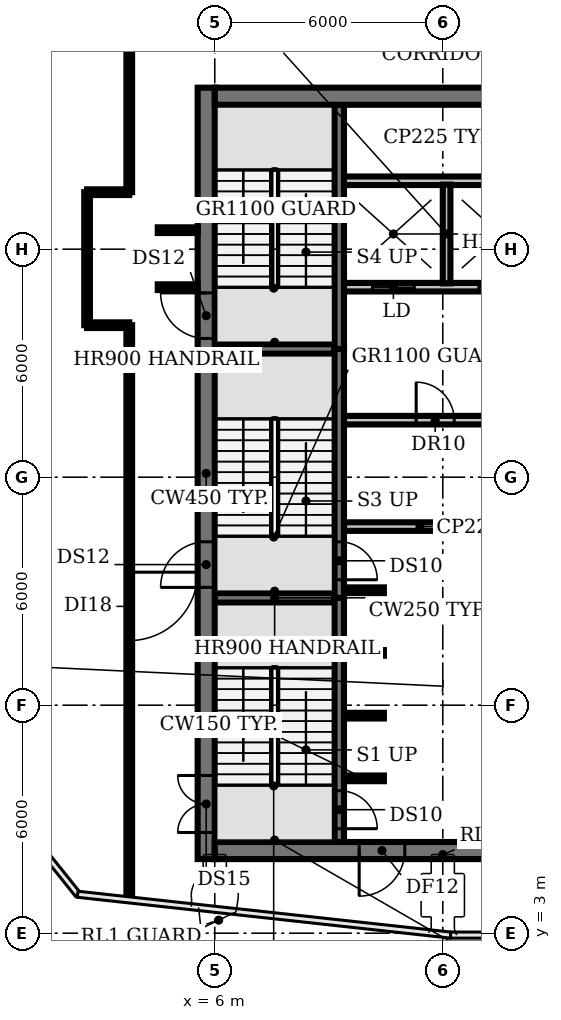
"""IFC4 building model, lengths in metres.
Left out: names, types, materials, properties, quantities, classifications, styles, units other than length and angle.
Written with IfcOpenShell. Run it as: python <this file> out.ifc"""

import sys

from ifc_helpers import new_model, si_unit, direction, frame, frame_2d, origin, place, context, subcontext, project, spatial, rectangle, extrude, element, fill, save


model = new_model("IFC4")
c1 = context("Model", 3, precision=1e-05, world=origin(), true_north=direction((0.0, 1.0)))
c2 = subcontext(c1, "Body", "Model", "MODEL_VIEW")
j1 = project(units=[si_unit("LENGTHUNIT", "METRE"), si_unit("PLANEANGLEUNIT", "RADIAN")], contexts=[c1])
p1 = place(None, origin())
s1 = spatial("IfcSite", under=j1, at=p1, CompositionType="ELEMENT")
p2 = place(p1, origin())
s2 = spatial("IfcBuilding", under=s1, at=p2, CompositionType="ELEMENT")
p3 = place(p2, frame((0.0, 0.0, 255.8)))
s3 = spatial("IfcBuildingStorey", under=s2, at=p3, CompositionType="ELEMENT", Elevation=255.8)
for number, where, z_axis, x_axis in (
    (1, (9.4, 7.075, 0.0), (0.0, 0.0, 1.0), (1.0, 0.0, 0.0)),
    (2, (9.4, 8.725, 0.0), (0.0, 0.0, 1.0), (1.0, 0.0, 0.0)),
    (3, (9.4, 10.375, 0.0), (0.0, 0.0, 1.0), (1.0, 0.0, 0.0)),
):
    element("IfcWall", number, at=place(p3, frame(where, z_axis=z_axis, x_axis=x_axis)), inside=s3, PredefinedType="SHEAR", context=c2, shape_type="SweptSolid", body=[
        extrude(rectangle(XDim=1.05, YDim=0.15, at=frame_2d((0.525, 0.0))), origin(), (0.0, 0.0, 1.0), 8.05),
    ])
p4 = place(p3, frame((6.0, 11.825, 0.0), z_axis=(0.0, 0.0, 1.0), x_axis=(1.0, 0.0, 0.0)))
e4 = element("IfcWall", 4, at=p4, inside=s3, PredefinedType="SHEAR", context=c2, shape_type="SweptSolid", body=[
    extrude(rectangle(XDim=3.15, YDim=0.25, at=frame_2d((1.575, 0.0))), origin(), (0.0, 0.0, 1.0), 8.05),
])
p5 = place(p3, frame((9.4, 12.025, 0.0), z_axis=(0.0, 0.0, 1.0), x_axis=(1.0, 0.0, 0.0)))
e5 = element("IfcWall", 5, at=p5, inside=s3, PredefinedType="SHEAR", context=c2, shape_type="SweptSolid", body=[
    extrude(rectangle(XDim=1.05, YDim=0.15, at=frame_2d((0.525, 0.0))), origin(), (0.0, 0.0, 1.0), 8.05),
])
p6 = place(p3, frame((9.4, 13.7, 0.0), z_axis=(0.0, 0.0, 1.0), x_axis=(1.0, 0.0, 0.0)))
e6 = element("IfcWall", 6, at=p6, inside=s3, PredefinedType="PARTITIONING", context=c2, shape_type="SweptSolid", body=[
    extrude(rectangle(XDim=4.0, YDim=0.225, at=frame_2d((2.0, 0.0))), origin(), (0.0, 0.0, 1.0), 8.05),
])
p7 = place(p3, frame((9.4, 16.5, 0.0), z_axis=(0.0, 0.0, 1.0), x_axis=(1.0, 0.0, 0.0)))
e7 = element("IfcWall", 7, at=p7, inside=s3, PredefinedType="PARTITIONING", context=c2, shape_type="SweptSolid", body=[
    extrude(rectangle(XDim=14.6, YDim=0.225, at=frame_2d((7.3, 0.0))), origin(), (0.0, 0.0, 1.0), 8.05),
])
p8 = place(p7, frame((1.9, 0.0, 0.0)))
e8 = element("IfcOpeningElement", 8, at=p8, cuts=e7, PredefinedType="OPENING", context=c2, shape_type="SweptSolid", body=[
    extrude(rectangle(XDim=1.0, YDim=2.1, at=frame_2d((0.5, 1.05))), frame((0.0, 0.123, 0.0), z_axis=(0.0, -1.0, 0.0), x_axis=(1.0, 0.0, 0.0)), (0.0, 0.0, 1.0), 0.245),
])
p9 = place(p7, frame((7.475, 0.0, 0.0)))
e9 = element("IfcOpeningElement", 9, at=p9, cuts=e7, PredefinedType="OPENING", context=c2, shape_type="SweptSolid", body=[
    extrude(rectangle(XDim=1.0, YDim=2.1, at=frame_2d((0.5, 1.05))), frame((0.0, 0.123, 0.0), z_axis=(0.0, -1.0, 0.0), x_axis=(1.0, 0.0, 0.0)), (0.0, 0.0, 1.0), 0.245),
])
p10 = place(p7, frame((11.647, 0.0, 0.0)))
e10 = element("IfcOpeningElement", 10, at=p10, cuts=e7, PredefinedType="OPENING", context=c2, shape_type="SweptSolid", body=[
    extrude(rectangle(XDim=0.9, YDim=2.1, at=frame_2d((0.45, 1.05))), frame((0.0, 0.123, 0.0), z_axis=(0.0, -1.0, 0.0), x_axis=(1.0, 0.0, 0.0)), (0.0, 0.0, 1.0), 0.245),
])
p11 = place(p7, frame((13.423, 0.0, 0.0)))
e11 = element("IfcOpeningElement", 11, at=p11, cuts=e7, PredefinedType="OPENING", context=c2, shape_type="SweptSolid", body=[
    extrude(rectangle(XDim=0.9, YDim=2.1, at=frame_2d((0.45, 1.05))), frame((0.0, 0.123, 0.0), z_axis=(0.0, -1.0, 0.0), x_axis=(1.0, 0.0, 0.0)), (0.0, 0.0, 1.0), 0.245),
])
p12 = place(p3, frame((6.0, 18.375, 0.0), z_axis=(0.0, 0.0, 1.0), x_axis=(1.0, 0.0, 0.0)))
e12 = element("IfcWall", 12, at=p12, inside=s3, PredefinedType="SHEAR", context=c2, shape_type="SweptSolid", body=[
    extrude(rectangle(XDim=3.15, YDim=0.25, at=frame_2d((1.575, 0.0))), origin(), (0.0, 0.0, 1.0), 8.05),
])
p13 = place(p3, frame((24.0, 20.0, 0.0), z_axis=(0.0, 0.0, 1.0), x_axis=(-1.0, 0.0, 0.0)))
e13 = element("IfcWall", 13, at=p13, inside=s3, PredefinedType="PARTITIONING", context=c2, shape_type="SweptSolid", body=[
    extrude(rectangle(XDim=14.6, YDim=0.225, at=frame_2d((7.3, 0.0))), origin(), (0.0, 0.0, 1.0), 8.05),
])
p14 = place(p13, frame((12.75, 0.0, 0.0)))
e14 = element("IfcOpeningElement", 14, at=p14, cuts=e13, PredefinedType="OPENING", context=c2, shape_type="SweptSolid", body=[
    extrude(rectangle(XDim=1.1, YDim=2.1, at=frame_2d((0.55, 1.05))), frame((0.0, 0.123, 0.0), z_axis=(0.0, -1.0, 0.0), x_axis=(1.0, 0.0, 0.0)), (0.0, 0.0, 1.0), 0.245),
])
p15 = place(p13, frame((9.95, 0.0, 0.0)))
e15 = element("IfcOpeningElement", 15, at=p15, cuts=e13, PredefinedType="OPENING", context=c2, shape_type="SweptSolid", body=[
    extrude(rectangle(XDim=1.1, YDim=2.1, at=frame_2d((0.55, 1.05))), frame((0.0, 0.123, 0.0), z_axis=(0.0, -1.0, 0.0), x_axis=(1.0, 0.0, 0.0)), (0.0, 0.0, 1.0), 0.245),
])
p16 = place(p13, frame((7.15, 0.0, 0.0)))
e16 = element("IfcOpeningElement", 16, at=p16, cuts=e13, PredefinedType="OPENING", context=c2, shape_type="SweptSolid", body=[
    extrude(rectangle(XDim=1.1, YDim=2.1, at=frame_2d((0.55, 1.05))), frame((0.0, 0.123, 0.0), z_axis=(0.0, -1.0, 0.0), x_axis=(1.0, 0.0, 0.0)), (0.0, 0.0, 1.0), 0.245),
])
p17 = place(p13, frame((4.35, 0.0, 0.0)))
e17 = element("IfcOpeningElement", 17, at=p17, cuts=e13, PredefinedType="OPENING", context=c2, shape_type="SweptSolid", body=[
    extrude(rectangle(XDim=1.1, YDim=2.1, at=frame_2d((0.55, 1.05))), frame((0.0, 0.123, 0.0), z_axis=(0.0, -1.0, 0.0), x_axis=(1.0, 0.0, 0.0)), (0.0, 0.0, 1.0), 0.245),
])
p18 = place(p13, frame((2.137, 0.0, 0.0)))
e18 = element("IfcOpeningElement", 18, at=p18, cuts=e13, PredefinedType="OPENING", context=c2, shape_type="SweptSolid", body=[
    extrude(rectangle(XDim=0.9, YDim=2.1, at=frame_2d((0.45, 1.05))), frame((0.0, 0.123, 0.0), z_axis=(0.0, -1.0, 0.0), x_axis=(1.0, 0.0, 0.0)), (0.0, 0.0, 1.0), 0.245),
])
p19 = place(p13, frame((0.363, 0.0, 0.0)))
e19 = element("IfcOpeningElement", 19, at=p19, cuts=e13, PredefinedType="OPENING", context=c2, shape_type="SweptSolid", body=[
    extrude(rectangle(XDim=0.9, YDim=2.1, at=frame_2d((0.45, 1.05))), frame((0.0, 0.123, 0.0), z_axis=(0.0, -1.0, 0.0), x_axis=(1.0, 0.0, 0.0)), (0.0, 0.0, 1.0), 0.245),
])
p20 = place(p3, frame((9.4, 22.8, 0.0), z_axis=(0.0, 0.0, 1.0), x_axis=(1.0, 0.0, 0.0)))
e20 = element("IfcWall", 20, at=p20, inside=s3, PredefinedType="PARTITIONING", context=c2, shape_type="SweptSolid", body=[
    extrude(rectangle(XDim=14.6, YDim=0.225, at=frame_2d((7.3, 0.0))), origin(), (0.0, 0.0, 1.0), 8.05),
])
p21 = place(p3, frame((9.275, 11.825, 0.0), z_axis=(0.0, 0.0, 1.0), x_axis=(0.0, -1.0, 0.0)))
e21 = element("IfcWall", 21, at=p21, inside=s3, PredefinedType="SHEAR", context=c2, shape_type="SweptSolid", body=[
    extrude(rectangle(XDim=6.425, YDim=0.25, at=frame_2d((3.212, 0.0))), origin(), (0.0, 0.0, 1.0), 8.05),
])
p22 = place(p21, frame((5.075, 0.0, 0.0)))
e22 = element("IfcOpeningElement", 22, at=p22, cuts=e21, PredefinedType="OPENING", context=c2, shape_type="SweptSolid", body=[
    extrude(rectangle(XDim=1.0, YDim=2.1, at=frame_2d((0.5, 1.05))), frame((0.0, 0.135, 0.0), z_axis=(0.0, -1.0, 0.0), x_axis=(1.0, 0.0, 0.0)), (0.0, 0.0, 1.0), 0.27),
])
p23 = place(p3, frame((9.275, 18.375, 0.0), z_axis=(0.0, 0.0, 1.0), x_axis=(0.0, -1.0, 0.0)))
e23 = element("IfcWall", 23, at=p23, inside=s3, PredefinedType="SHEAR", context=c2, shape_type="SweptSolid", body=[
    extrude(rectangle(XDim=6.55, YDim=0.25, at=frame_2d((3.275, 0.0))), origin(), (0.0, 0.0, 1.0), 8.05),
])
p24 = place(p23, frame((5.075, 0.0, 0.0)))
e24 = element("IfcOpeningElement", 24, at=p24, cuts=e23, PredefinedType="OPENING", context=c2, shape_type="SweptSolid", body=[
    extrude(rectangle(XDim=1.0, YDim=2.1, at=frame_2d((0.5, 1.05))), frame((0.0, 0.135, 0.0), z_axis=(0.0, -1.0, 0.0), x_axis=(1.0, 0.0, 0.0)), (0.0, 0.0, 1.0), 0.27),
])
p25 = place(p3, frame((9.275, 18.375, 0.0), z_axis=(0.0, 0.0, 1.0), x_axis=(0.0, 1.0, 0.0)))
e25 = element("IfcWall", 25, at=p25, inside=s3, PredefinedType="SHEAR", context=c2, shape_type="SweptSolid", body=[
    extrude(rectangle(XDim=6.425, YDim=0.25, at=frame_2d((3.212, 0.0))), origin(), (0.0, 0.0, 1.0), 8.05),
])
p26 = place(p3, frame((12.1, 20.1, 0.0), z_axis=(0.0, 0.0, 1.0), x_axis=(0.0, 1.0, 0.0)))
e26 = element("IfcWall", 26, at=p26, inside=s3, PredefinedType="SOLIDWALL", context=c2, shape_type="SweptSolid", body=[
    extrude(rectangle(XDim=2.6, YDim=0.2, at=frame_2d((1.3, 0.0))), origin(), (0.0, 0.0, 1.0), 8.05),
])
p27 = place(p3, frame((5.775, 4.95, 0.0), z_axis=(0.0, 0.0, 1.0), x_axis=(0.0, 1.0, 0.0)))
e27 = element("IfcWall", 27, at=p27, inside=s3, PredefinedType="SHEAR", context=c2, shape_type="SweptSolid", body=[
    extrude(rectangle(XDim=20.3, YDim=0.45, at=frame_2d((10.15, 0.0))), origin(), (0.0, 0.0, 1.0), 8.05),
])
p28 = place(p27, frame((0.7, 0.0, 0.0)))
e28 = element("IfcOpeningElement", 28, at=p28, cuts=e27, PredefinedType="OPENING", context=c2, shape_type="SweptSolid", body=[
    extrude(rectangle(XDim=1.5, YDim=2.1, at=frame_2d((0.75, 1.05))), frame((0.0, 0.235, 0.0), z_axis=(0.0, -1.0, 0.0), x_axis=(1.0, 0.0, 0.0)), (0.0, 0.0, 1.0), 0.47),
])
p29 = place(p27, frame((7.15, 0.0, 0.0)))
e29 = element("IfcOpeningElement", 29, at=p29, cuts=e27, PredefinedType="OPENING", context=c2, shape_type="SweptSolid", body=[
    extrude(rectangle(XDim=1.2, YDim=2.1, at=frame_2d((0.6, 1.05))), frame((0.0, 0.235, 0.0), z_axis=(0.0, -1.0, 0.0), x_axis=(1.0, 0.0, 0.0)), (0.0, 0.0, 1.0), 0.47),
])
p30 = place(p27, frame((13.7, 0.0, 0.0)))
e30 = element("IfcOpeningElement", 30, at=p30, cuts=e27, PredefinedType="OPENING", context=c2, shape_type="SweptSolid", body=[
    extrude(rectangle(XDim=1.2, YDim=2.1, at=frame_2d((0.6, 1.05))), frame((0.0, 0.235, 0.0), z_axis=(0.0, -1.0, 0.0), x_axis=(1.0, 0.0, 0.0)), (0.0, 0.0, 1.0), 0.47),
])
p31 = place(p3, frame((24.0, 5.175, 0.0), z_axis=(0.0, 0.0, 1.0), x_axis=(-1.0, 0.0, 0.0)))
e31 = element("IfcWall", 31, at=p31, inside=s3, PredefinedType="SHEAR", context=c2, shape_type="SweptSolid", body=[
    extrude(rectangle(XDim=18.0, YDim=0.45, at=frame_2d((9.0, 0.0))), origin(), (0.0, 0.0, 1.0), 8.05),
])
p32 = place(p31, frame((13.0, 0.0, 0.0)))
e32 = element("IfcOpeningElement", 32, at=p32, cuts=e31, PredefinedType="OPENING", context=c2, shape_type="SweptSolid", body=[
    extrude(rectangle(XDim=1.2, YDim=2.1, at=frame_2d((0.6, 1.05))), frame((0.0, 0.235, 0.0), z_axis=(0.0, -1.0, 0.0), x_axis=(1.0, 0.0, 0.0)), (0.0, 0.0, 1.0), 0.47),
])
p33 = place(p31, frame((4.05, 0.0, 0.0)))
e33 = element("IfcOpeningElement", 33, at=p33, cuts=e31, PredefinedType="OPENING", context=c2, shape_type="SweptSolid", body=[
    extrude(rectangle(XDim=1.0, YDim=2.1, at=frame_2d((0.5, 1.05))), frame((0.0, 0.235, 0.0), z_axis=(0.0, -1.0, 0.0), x_axis=(1.0, 0.0, 0.0)), (0.0, 0.0, 1.0), 0.47),
])
p34 = place(p3, frame((6.0, 25.025, 0.0), z_axis=(0.0, 0.0, 1.0), x_axis=(1.0, 0.0, 0.0)))
e34 = element("IfcWall", 34, at=p34, inside=s3, PredefinedType="SHEAR", context=c2, shape_type="SweptSolid", body=[
    extrude(rectangle(XDim=18.0, YDim=0.45, at=frame_2d((9.0, 0.0))), origin(), (0.0, 0.0, 1.0), 8.05),
])
p35 = place(p3, frame((2.64, 19.0, 0.0), z_axis=(0.0, 0.0, 1.0), x_axis=(0.0, 1.0, 0.0)))
e35 = element("IfcWall", 35, at=p35, inside=s3, PredefinedType="PARTITIONING", context=c2, shape_type="SweptSolid", body=[
    extrude(rectangle(XDim=3.5, YDim=0.15, at=frame_2d((1.75, 0.0))), origin(), (0.0, 0.0, 1.0), 6.33),
])
for number, where, z_axis, x_axis in (
    (36, (2.64, 19.0, 0.0), (0.0, 0.0, 1.0), (1.0, 0.0, 0.0)),
    (37, (2.64, 22.5, 0.0), (0.0, 0.0, 1.0), (1.0, 0.0, 0.0)),
):
    element("IfcWall", number, at=place(p3, frame(where, z_axis=z_axis, x_axis=x_axis)), inside=s3, PredefinedType="PARTITIONING", context=c2, shape_type="SweptSolid", body=[
        extrude(rectangle(XDim=1.11, YDim=0.15, at=frame_2d((0.555, 0.0))), origin(), (0.0, 0.0, 1.0), 6.33),
    ])
p36 = place(p3, frame((3.75, 19.0, 0.0), z_axis=(0.0, 0.0, 1.0), x_axis=(0.0, -1.0, 0.0)))
e38 = element("IfcWall", 38, at=p36, inside=s3, PredefinedType="PARTITIONING", context=c2, shape_type="SweptSolid", body=[
    extrude(rectangle(XDim=15.07, YDim=0.15, at=frame_2d((7.535, 0.0))), origin(), (0.0, 0.0, 1.0), 6.33),
])
p37 = place(p36, frame((6.5, 0.0, 0.0)))
e39 = element("IfcOpeningElement", 39, at=p37, cuts=e38, PredefinedType="OPENING", context=c2, shape_type="SweptSolid", body=[
    extrude(rectangle(XDim=1.8, YDim=2.1, at=frame_2d((0.9, 1.05))), frame((0.0, 0.085, 0.0), z_axis=(0.0, -1.0, 0.0), x_axis=(1.0, 0.0, 0.0)), (0.0, 0.0, 1.0), 0.17),
])
p38 = place(p3, frame((3.75, 22.5, 0.0), z_axis=(0.0, 0.0, 1.0), x_axis=(0.0, 1.0, 0.0)))
e40 = element("IfcWall", 40, at=p38, inside=s3, PredefinedType="PARTITIONING", context=c2, shape_type="SweptSolid", body=[
    extrude(rectangle(XDim=4.55, YDim=0.15, at=frame_2d((2.275, 0.0))), origin(), (0.0, 0.0, 1.0), 6.33),
])
for number, where, z_axis, x_axis in (
    (41, (4.5, 20.0, 0.0), (0.0, 0.0, 1.0), (1.0, 0.0, 0.0)),
    (42, (4.5, 21.5, 0.0), (0.0, 0.0, 1.0), (1.0, 0.0, 0.0)),
):
    element("IfcWall", number, at=place(p3, frame(where, z_axis=z_axis, x_axis=x_axis)), inside=s3, PredefinedType="PARTITIONING", context=c2, shape_type="SweptSolid", body=[
        extrude(rectangle(XDim=1.05, YDim=0.15, at=frame_2d((0.525, 0.0))), origin(), (0.0, 0.0, 1.0), 6.33),
    ])
p39 = place(p8, origin())
e43 = element("IfcDoor", 43, at=p39, inside=s3, OperationType="SINGLE_SWING_LEFT", PredefinedType="DOOR", context=c2, shape_type="SweptSolid", body=[
    extrude(rectangle(XDim=1.0, YDim=2.1, at=frame_2d((0.5, 1.05))), frame((0.0, 0.025, 0.0), z_axis=(0.0, -1.0, 0.0), x_axis=(1.0, 0.0, 0.0)), (0.0, 0.0, 1.0), 0.05),
])
fill(e8, e43)
p40 = place(p14, origin())
e44 = element("IfcDoor", 44, at=p40, inside=s3, OperationType="DOUBLE_DOOR_SLIDING", PredefinedType="DOOR", context=c2, shape_type="SweptSolid", body=[
    extrude(rectangle(XDim=1.1, YDim=2.1, at=frame_2d((0.55, 1.05))), frame((0.0, 0.025, 0.0), z_axis=(0.0, -1.0, 0.0), x_axis=(1.0, 0.0, 0.0)), (0.0, 0.0, 1.0), 0.05),
])
fill(e14, e44)
p41 = place(p15, origin())
e45 = element("IfcDoor", 45, at=p41, inside=s3, OperationType="DOUBLE_DOOR_SLIDING", PredefinedType="DOOR", context=c2, shape_type="SweptSolid", body=[
    extrude(rectangle(XDim=1.1, YDim=2.1, at=frame_2d((0.55, 1.05))), frame((0.0, 0.025, 0.0), z_axis=(0.0, -1.0, 0.0), x_axis=(1.0, 0.0, 0.0)), (0.0, 0.0, 1.0), 0.05),
])
fill(e15, e45)
p42 = place(p22, origin())
e46 = element("IfcDoor", 46, at=p42, inside=s3, OperationType="SINGLE_SWING_RIGHT", PredefinedType="DOOR", context=c2, shape_type="SweptSolid", body=[
    extrude(rectangle(XDim=1.0, YDim=2.1, at=frame_2d((0.5, 1.05))), frame((0.0, 0.025, 0.0), z_axis=(0.0, -1.0, 0.0), x_axis=(1.0, 0.0, 0.0)), (0.0, 0.0, 1.0), 0.05),
])
fill(e22, e46)
p43 = place(p24, origin())
e47 = element("IfcDoor", 47, at=p43, inside=s3, OperationType="SINGLE_SWING_RIGHT", PredefinedType="DOOR", context=c2, shape_type="SweptSolid", body=[
    extrude(rectangle(XDim=1.0, YDim=2.1, at=frame_2d((0.5, 1.05))), frame((0.0, 0.025, 0.0), z_axis=(0.0, -1.0, 0.0), x_axis=(1.0, 0.0, 0.0)), (0.0, 0.0, 1.0), 0.05),
])
fill(e24, e47)
p44 = place(p28, origin())
e48 = element("IfcDoor", 48, at=p44, inside=s3, OperationType="DOUBLE_DOOR_SINGLE_SWING", PredefinedType="DOOR", context=c2, shape_type="SweptSolid", body=[
    extrude(rectangle(XDim=1.5, YDim=2.1, at=frame_2d((0.75, 1.05))), frame((0.0, 0.025, 0.0), z_axis=(0.0, -1.0, 0.0), x_axis=(1.0, 0.0, 0.0)), (0.0, 0.0, 1.0), 0.05),
])
fill(e28, e48)
p45 = place(p29, origin())
e49 = element("IfcDoor", 49, at=p45, inside=s3, OperationType="SINGLE_SWING_LEFT", PredefinedType="DOOR", context=c2, shape_type="SweptSolid", body=[
    extrude(rectangle(XDim=1.2, YDim=2.1, at=frame_2d((0.6, 1.05))), frame((0.0, 0.025, 0.0), z_axis=(0.0, -1.0, 0.0), x_axis=(1.0, 0.0, 0.0)), (0.0, 0.0, 1.0), 0.05),
])
fill(e29, e49)
p46 = place(p30, origin())
e50 = element("IfcDoor", 50, at=p46, inside=s3, OperationType="SINGLE_SWING_RIGHT", PredefinedType="DOOR", context=c2, shape_type="SweptSolid", body=[
    extrude(rectangle(XDim=1.2, YDim=2.1, at=frame_2d((0.6, 1.05))), frame((0.0, 0.025, 0.0), z_axis=(0.0, -1.0, 0.0), x_axis=(1.0, 0.0, 0.0)), (0.0, 0.0, 1.0), 0.05),
])
fill(e30, e50)
p47 = place(p32, origin())
e51 = element("IfcDoor", 51, at=p47, inside=s3, OperationType="SINGLE_SWING_RIGHT", PredefinedType="DOOR", context=c2, shape_type="SweptSolid", body=[
    extrude(rectangle(XDim=1.2, YDim=2.1, at=frame_2d((0.6, 1.05))), frame((0.0, 0.025, 0.0), z_axis=(0.0, -1.0, 0.0), x_axis=(1.0, 0.0, 0.0)), (0.0, 0.0, 1.0), 0.05),
])
fill(e32, e51)
p48 = place(p37, origin())
e52 = element("IfcDoor", 52, at=p48, inside=s3, OperationType="SINGLE_SWING_LEFT", PredefinedType="DOOR", context=c2, shape_type="SweptSolid", body=[
    extrude(rectangle(XDim=1.8, YDim=2.1, at=frame_2d((0.9, 1.05))), frame((0.0, 0.025, 0.0), z_axis=(0.0, -1.0, 0.0), x_axis=(1.0, 0.0, 0.0)), (0.0, 0.0, 1.0), 0.05),
])
fill(e39, e52)
save(model, sys.argv[1])
